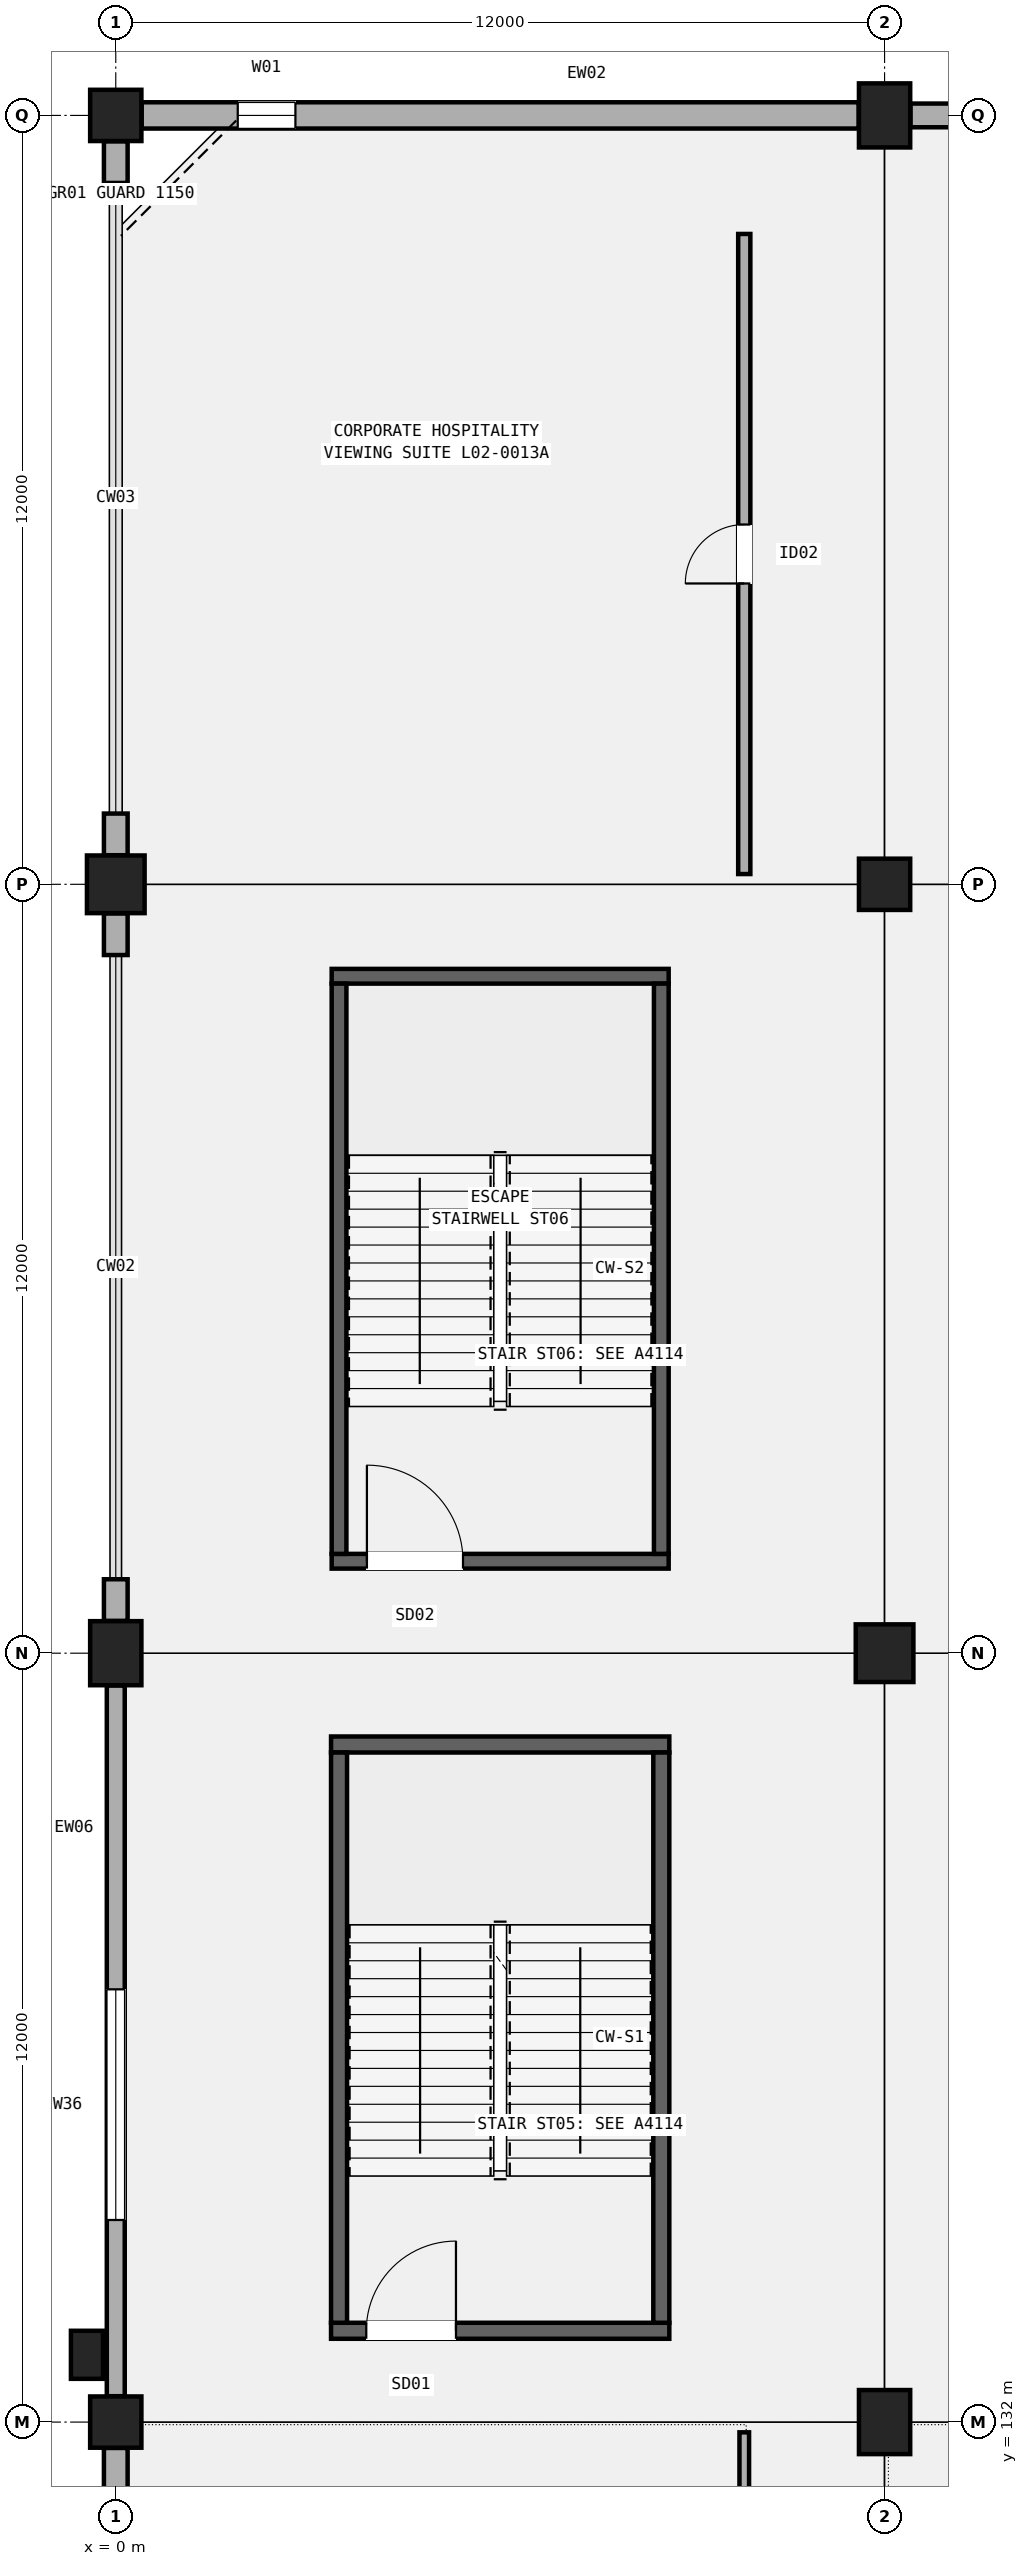
"""IFC4 building model, lengths in metres.
Left out: names, types, materials, properties, quantities, classifications, styles, units other than length and angle.
Written with IfcOpenShell. Run it as: python <this file> out.ifc"""

import sys

from ifc_helpers import new_model, si_unit, direction, frame, frame_2d, origin, origin_2d, place, context, subcontext, project, spatial, rectangle, extrude, element, fill, save


model = new_model("IFC4")
c1 = context("Model", 3, precision=1e-05, world=origin(), true_north=direction((0.0, 1.0)))
c2 = subcontext(c1, "Body", "Model", "MODEL_VIEW")
j1 = project(units=[si_unit("LENGTHUNIT", "METRE"), si_unit("PLANEANGLEUNIT", "RADIAN")], contexts=[c1])
p1 = place(None, origin())
s1 = spatial("IfcSite", under=j1, at=p1, CompositionType="ELEMENT")
p2 = place(p1, origin())
s2 = spatial("IfcBuilding", under=s1, at=p2, CompositionType="ELEMENT")
p3 = place(p2, frame((0.0, 0.0, 10.2)))
s3 = spatial("IfcBuildingStorey", under=s2, at=p3, CompositionType="ELEMENT", Elevation=10.2)
p4 = place(p3, frame((0.0, 132.0, 0.0), z_axis=(0.0, 0.0, 1.0), x_axis=(1.0, 0.0, 0.0)))
e1 = element("IfcColumn", 1, at=p4, inside=s3, PredefinedType="COLUMN", context=c2, shape_type="SweptSolid", body=[
    extrude(rectangle(XDim=0.8, YDim=0.8, at=origin_2d()), origin(), (0.0, 0.0, 1.0), 5.1),
])
p5 = place(p3, frame((0.0, 144.0, 0.0), z_axis=(0.0, 0.0, 1.0), x_axis=(1.0, 0.0, 0.0)))
e2 = element("IfcColumn", 2, at=p5, inside=s3, PredefinedType="COLUMN", context=c2, shape_type="SweptSolid", body=[
    extrude(rectangle(XDim=0.8, YDim=1.0, at=origin_2d()), origin(), (0.0, 0.0, 1.0), 5.1),
])
p6 = place(p3, frame((0.0, 156.0, 0.0), z_axis=(0.0, 0.0, 1.0), x_axis=(1.0, 0.0, 0.0)))
e3 = element("IfcColumn", 3, at=p6, inside=s3, PredefinedType="COLUMN", context=c2, shape_type="SweptSolid", body=[
    extrude(rectangle(XDim=0.9, YDim=0.9, at=origin_2d()), origin(), (0.0, 0.0, 1.0), 5.1),
])
p7 = place(p3, frame((0.0, 168.0, 0.0), z_axis=(0.0, 0.0, 1.0), x_axis=(1.0, 0.0, 0.0)))
e4 = element("IfcColumn", 4, at=p7, inside=s3, PredefinedType="COLUMN", context=c2, shape_type="SweptSolid", body=[
    extrude(rectangle(XDim=0.8, YDim=0.8, at=origin_2d()), origin(), (0.0, 0.0, 1.0), 5.1),
])
p8 = place(p3, frame((12.0, 132.0, 0.0), z_axis=(0.0, 0.0, 1.0), x_axis=(1.0, 0.0, 0.0)))
e5 = element("IfcColumn", 5, at=p8, inside=s3, PredefinedType="COLUMN", context=c2, shape_type="SweptSolid", body=[
    extrude(rectangle(XDim=0.8, YDim=1.0, at=origin_2d()), origin(), (0.0, 0.0, 1.0), 5.1),
])
p9 = place(p3, frame((12.0, 144.0, 0.0), z_axis=(0.0, 0.0, 1.0), x_axis=(1.0, 0.0, 0.0)))
e6 = element("IfcColumn", 6, at=p9, inside=s3, PredefinedType="COLUMN", context=c2, shape_type="SweptSolid", body=[
    extrude(rectangle(XDim=0.9, YDim=0.9, at=origin_2d()), origin(), (0.0, 0.0, 1.0), 5.1),
])
p10 = place(p3, frame((12.0, 156.0, 0.0), z_axis=(0.0, 0.0, 1.0), x_axis=(1.0, 0.0, 0.0)))
e7 = element("IfcColumn", 7, at=p10, inside=s3, PredefinedType="COLUMN", context=c2, shape_type="SweptSolid", body=[
    extrude(rectangle(XDim=0.8, YDim=0.8, at=origin_2d()), origin(), (0.0, 0.0, 1.0), 5.1),
])
p11 = place(p3, frame((12.0, 168.0, 0.0), z_axis=(0.0, 0.0, 1.0), x_axis=(1.0, 0.0, 0.0)))
e8 = element("IfcColumn", 8, at=p11, inside=s3, PredefinedType="COLUMN", context=c2, shape_type="SweptSolid", body=[
    extrude(rectangle(XDim=0.8, YDim=1.0, at=origin_2d()), origin(), (0.0, 0.0, 1.0), 5.1),
])
p12 = place(p3, frame((-0.45, 133.05, 0.0), z_axis=(0.0, 0.0, 1.0), x_axis=(1.0, 0.0, 0.0)))
e9 = element("IfcColumn", 9, at=p12, inside=s3, PredefinedType="PILASTER", context=c2, shape_type="SweptSolid", body=[
    extrude(rectangle(XDim=0.5, YDim=0.75, at=origin_2d()), origin(), (0.0, 0.0, 1.0), 5.1),
])
p13 = place(p3, frame((0.0, 130.946, 0.0), z_axis=(0.0, 0.0, 1.0), x_axis=(0.0, 1.0, 0.0)))
e10 = element("IfcWall", 10, at=p13, inside=s3, PredefinedType="SOLIDWALL", context=c2, shape_type="SweptSolid", body=[
    extrude(rectangle(XDim=0.65, YDim=0.37, at=frame_2d((0.325, 0.0))), origin(), (0.0, 0.0, 1.0), 4.12),
])
p14 = place(p3, frame((0.0, 132.404, 0.0), z_axis=(0.0, 0.0, 1.0), x_axis=(0.0, 1.0, 0.0)))
e11 = element("IfcWall", 11, at=p14, inside=s3, PredefinedType="SOLIDWALL", context=c2, shape_type="SweptSolid", body=[
    extrude(rectangle(XDim=11.092, YDim=0.28, at=frame_2d((5.546, 0.0))), origin(), (0.0, 0.0, 1.0), 4.232),
])
p15 = place(p14, frame((2.75, 0.0, 0.95)))
e12 = element("IfcOpeningElement", 12, at=p15, cuts=e11, PredefinedType="OPENING", context=c2, shape_type="SweptSolid", body=[
    extrude(rectangle(XDim=3.6, YDim=2.15, at=frame_2d((1.8, 1.075))), frame((0.0, 0.15, 0.0), z_axis=(0.0, -1.0, 0.0), x_axis=(1.0, 0.0, 0.0)), (0.0, 0.0, 1.0), 0.3),
])
p16 = place(p3, frame((0.0, 144.504, 0.0), z_axis=(0.0, 0.0, 1.0), x_axis=(0.0, 1.0, 0.0)))
e13 = element("IfcWall", 13, at=p16, inside=s3, PredefinedType="SOLIDWALL", context=c2, shape_type="SweptSolid", body=[
    extrude(rectangle(XDim=0.65, YDim=0.37, at=frame_2d((0.325, 0.0))), origin(), (0.0, 0.0, 1.0), 4.02),
])
p17 = place(p3, frame((0.0, 154.896, 0.0), z_axis=(0.0, 0.0, 1.0), x_axis=(0.0, 1.0, 0.0)))
e14 = element("IfcWall", 14, at=p17, inside=s3, PredefinedType="SOLIDWALL", context=c2, shape_type="SweptSolid", body=[
    extrude(rectangle(XDim=0.65, YDim=0.37, at=frame_2d((0.325, 0.0))), origin(), (0.0, 0.0, 1.0), 4.02),
])
p18 = place(p3, frame((0.404, 168.0, 0.0), z_axis=(0.0, 0.0, 1.0), x_axis=(1.0, 0.0, 0.0)))
e15 = element("IfcWall", 15, at=p18, inside=s3, PredefinedType="SOLIDWALL", context=c2, shape_type="SweptSolid", body=[
    extrude(rectangle(XDim=11.192, YDim=0.41, at=frame_2d((5.596, 0.0))), origin(), (0.0, 0.0, 1.0), 4.22),
])
p19 = place(p18, frame((1.5, 0.0, 0.95)))
e16 = element("IfcOpeningElement", 16, at=p19, cuts=e15, PredefinedType="OPENING", context=c2, shape_type="SweptSolid", body=[
    extrude(rectangle(XDim=0.9, YDim=2.1, at=frame_2d((0.45, 1.05))), frame((0.0, 0.215, 0.0), z_axis=(0.0, -1.0, 0.0), x_axis=(1.0, 0.0, 0.0)), (0.0, 0.0, 1.0), 0.43),
])
for number, where, z_axis, x_axis in (
    (17, (0.0, 156.454, 0.0), (0.0, 0.0, 1.0), (0.0, 1.0, 0.0)),
    (18, (0.0, 166.946, 0.0), (0.0, 0.0, 1.0), (0.0, 1.0, 0.0)),
):
    element("IfcWall", number, at=place(p3, frame(where, z_axis=z_axis, x_axis=x_axis)), inside=s3, PredefinedType="SOLIDWALL", context=c2, shape_type="SweptSolid", body=[
        extrude(rectangle(XDim=0.65, YDim=0.37, at=frame_2d((0.325, 0.0))), origin(), (0.0, 0.0, 1.0), 4.12),
    ])
p20 = place(p3, frame((12.404, 168.0, 0.0), z_axis=(0.0, 0.0, 1.0), x_axis=(1.0, 0.0, 0.0)))
e19 = element("IfcWall", 19, at=p20, inside=s3, PredefinedType="SOLIDWALL", context=c2, shape_type="SweptSolid", body=[
    extrude(rectangle(XDim=0.65, YDim=0.37, at=frame_2d((0.325, 0.0))), origin(), (0.0, 0.0, 1.0), 4.02),
])
p21 = place(p3, frame((3.36, 133.425, 0.0), z_axis=(0.0, 0.0, 1.0), x_axis=(1.0, 0.0, 0.0)))
e20 = element("IfcWall", 20, at=p21, inside=s3, PredefinedType="SHEAR", context=c2, shape_type="SweptSolid", body=[
    extrude(rectangle(XDim=5.28, YDim=0.25, at=frame_2d((2.64, 0.0))), origin(), (0.0, 0.0, 1.0), 4.82),
])
p22 = place(p21, frame((0.55, 0.0, 0.0)))
e21 = element("IfcOpeningElement", 21, at=p22, cuts=e20, PredefinedType="OPENING", context=c2, shape_type="SweptSolid", body=[
    extrude(rectangle(XDim=1.4, YDim=2.15, at=frame_2d((0.7, 1.075))), frame((0.0, 0.135, 0.0), z_axis=(0.0, -1.0, 0.0), x_axis=(1.0, 0.0, 0.0)), (0.0, 0.0, 1.0), 0.27),
])
p23 = place(p3, frame((3.36, 142.575, 0.0), z_axis=(0.0, 0.0, 1.0), x_axis=(1.0, 0.0, 0.0)))
e22 = element("IfcWall", 22, at=p23, inside=s3, PredefinedType="SHEAR", context=c2, shape_type="SweptSolid", body=[
    extrude(rectangle(XDim=5.28, YDim=0.25, at=frame_2d((2.64, 0.0))), origin(), (0.0, 0.0, 1.0), 4.82),
])
for number, where, z_axis, x_axis in (
    (23, (3.485, 133.55, 0.0), (0.0, 0.0, 1.0), (0.0, 1.0, 0.0)),
    (24, (8.515, 133.55, 0.0), (0.0, 0.0, 1.0), (0.0, 1.0, 0.0)),
):
    element("IfcWall", number, at=place(p3, frame(where, z_axis=z_axis, x_axis=x_axis)), inside=s3, PredefinedType="SHEAR", context=c2, shape_type="SweptSolid", body=[
        extrude(rectangle(XDim=8.9, YDim=0.25, at=frame_2d((4.45, 0.0))), origin(), (0.0, 0.0, 1.0), 4.82),
    ])
p24 = place(p3, frame((3.37, 145.435, 0.0), z_axis=(0.0, 0.0, 1.0), x_axis=(1.0, 0.0, 0.0)))
e25 = element("IfcWall", 25, at=p24, inside=s3, PredefinedType="SHEAR", context=c2, shape_type="SweptSolid", body=[
    extrude(rectangle(XDim=5.26, YDim=0.23, at=frame_2d((2.63, 0.0))), origin(), (0.0, 0.0, 1.0), 4.82),
])
p25 = place(p24, frame((0.55, 0.0, 0.0)))
e26 = element("IfcOpeningElement", 26, at=p25, cuts=e25, PredefinedType="OPENING", context=c2, shape_type="SweptSolid", body=[
    extrude(rectangle(XDim=1.5, YDim=2.2, at=frame_2d((0.75, 1.1))), frame((0.0, 0.125, 0.0), z_axis=(0.0, -1.0, 0.0), x_axis=(1.0, 0.0, 0.0)), (0.0, 0.0, 1.0), 0.25),
])
p26 = place(p3, frame((3.37, 154.565, 0.0), z_axis=(0.0, 0.0, 1.0), x_axis=(1.0, 0.0, 0.0)))
e27 = element("IfcWall", 27, at=p26, inside=s3, PredefinedType="SHEAR", context=c2, shape_type="SweptSolid", body=[
    extrude(rectangle(XDim=5.26, YDim=0.23, at=frame_2d((2.63, 0.0))), origin(), (0.0, 0.0, 1.0), 4.82),
])
for number, where, z_axis, x_axis in (
    (28, (3.485, 145.55, 0.0), (0.0, 0.0, 1.0), (0.0, 1.0, 0.0)),
    (29, (8.515, 145.55, 0.0), (0.0, 0.0, 1.0), (0.0, 1.0, 0.0)),
):
    element("IfcWall", number, at=place(p3, frame(where, z_axis=z_axis, x_axis=x_axis)), inside=s3, PredefinedType="SHEAR", context=c2, shape_type="SweptSolid", body=[
        extrude(rectangle(XDim=8.9, YDim=0.23, at=frame_2d((4.45, 0.0))), origin(), (0.0, 0.0, 1.0), 4.82),
    ])
p27 = place(p3, frame((9.81, 120.16, 0.0), z_axis=(0.0, 0.0, 1.0), x_axis=(0.0, 1.0, 0.0)))
e30 = element("IfcWall", 30, at=p27, inside=s3, PredefinedType="PARTITIONING", context=c2, shape_type="SweptSolid", body=[
    extrude(rectangle(XDim=11.68, YDim=0.15, at=frame_2d((5.84, 0.0))), origin(), (0.0, 0.0, 1.0), 4.22),
])
p28 = place(p27, frame((5.39, 0.0, 0.0)))
e31 = element("IfcOpeningElement", 31, at=p28, cuts=e30, PredefinedType="OPENING", context=c2, shape_type="SweptSolid", body=[
    extrude(rectangle(XDim=0.9, YDim=2.06, at=frame_2d((0.45, 1.03))), frame((0.0, 0.085, 0.0), z_axis=(0.0, -1.0, 0.0), x_axis=(1.0, 0.0, 0.0)), (0.0, 0.0, 1.0), 0.17),
])
p29 = place(p3, frame((9.81, 156.16, 0.0), z_axis=(0.0, 0.0, 1.0), x_axis=(0.0, 1.0, 0.0)))
e32 = element("IfcWall", 32, at=p29, inside=s3, PredefinedType="PARTITIONING", context=c2, shape_type="SweptSolid", body=[
    extrude(rectangle(XDim=9.99, YDim=0.19, at=frame_2d((4.995, 0.0))), origin(), (0.0, 0.0, 1.0), 4.22),
])
p30 = place(p29, frame((4.535, 0.0, 0.0)))
e33 = element("IfcOpeningElement", 33, at=p30, cuts=e32, PredefinedType="OPENING", context=c2, shape_type="SweptSolid", body=[
    extrude(rectangle(XDim=0.92, YDim=2.1, at=frame_2d((0.46, 1.05))), frame((0.0, 0.105, 0.0), z_axis=(0.0, -1.0, 0.0), x_axis=(1.0, 0.0, 0.0)), (0.0, 0.0, 1.0), 0.21),
])
p31 = place(p15, origin())
e34 = element("IfcWindow", 34, at=p31, inside=s3, PartitioningType="SINGLE_PANEL", PredefinedType="WINDOW", context=c2, shape_type="SweptSolid", body=[
    extrude(rectangle(XDim=3.6, YDim=2.15, at=frame_2d((1.8, 1.075))), frame((0.0, 0.03, 0.0), z_axis=(0.0, -1.0, 0.0), x_axis=(1.0, 0.0, 0.0)), (0.0, 0.0, 1.0), 0.06),
])
fill(e12, e34)
p32 = place(p19, origin())
e35 = element("IfcWindow", 35, at=p32, inside=s3, PartitioningType="SINGLE_PANEL", PredefinedType="WINDOW", context=c2, shape_type="SweptSolid", body=[
    extrude(rectangle(XDim=0.9, YDim=2.1, at=frame_2d((0.45, 1.05))), frame((0.0, 0.03, 0.0), z_axis=(0.0, -1.0, 0.0), x_axis=(1.0, 0.0, 0.0)), (0.0, 0.0, 1.0), 0.06),
])
fill(e16, e35)
p33 = place(p22, origin())
e36 = element("IfcDoor", 36, at=p33, inside=s3, OperationType="SINGLE_SWING_RIGHT", PredefinedType="DOOR", context=c2, shape_type="SweptSolid", body=[
    extrude(rectangle(XDim=1.4, YDim=2.15, at=frame_2d((0.7, 1.075))), frame((0.0, 0.025, 0.0), z_axis=(0.0, -1.0, 0.0), x_axis=(1.0, 0.0, 0.0)), (0.0, 0.0, 1.0), 0.05),
])
fill(e21, e36)
p34 = place(p25, origin())
e37 = element("IfcDoor", 37, at=p34, inside=s3, OperationType="SINGLE_SWING_LEFT", PredefinedType="DOOR", context=c2, shape_type="SweptSolid", body=[
    extrude(rectangle(XDim=1.5, YDim=2.2, at=frame_2d((0.75, 1.1))), frame((0.0, 0.025, 0.0), z_axis=(0.0, -1.0, 0.0), x_axis=(1.0, 0.0, 0.0)), (0.0, 0.0, 1.0), 0.05),
])
fill(e26, e37)
p35 = place(p30, origin())
e38 = element("IfcDoor", 38, at=p35, inside=s3, OperationType="SINGLE_SWING_LEFT", PredefinedType="DOOR", context=c2, shape_type="SweptSolid", body=[
    extrude(rectangle(XDim=0.92, YDim=2.1, at=frame_2d((0.46, 1.05))), frame((0.0, 0.025, 0.0), z_axis=(0.0, -1.0, 0.0), x_axis=(1.0, 0.0, 0.0)), (0.0, 0.0, 1.0), 0.05),
])
fill(e33, e38)
save(model, sys.argv[1])
